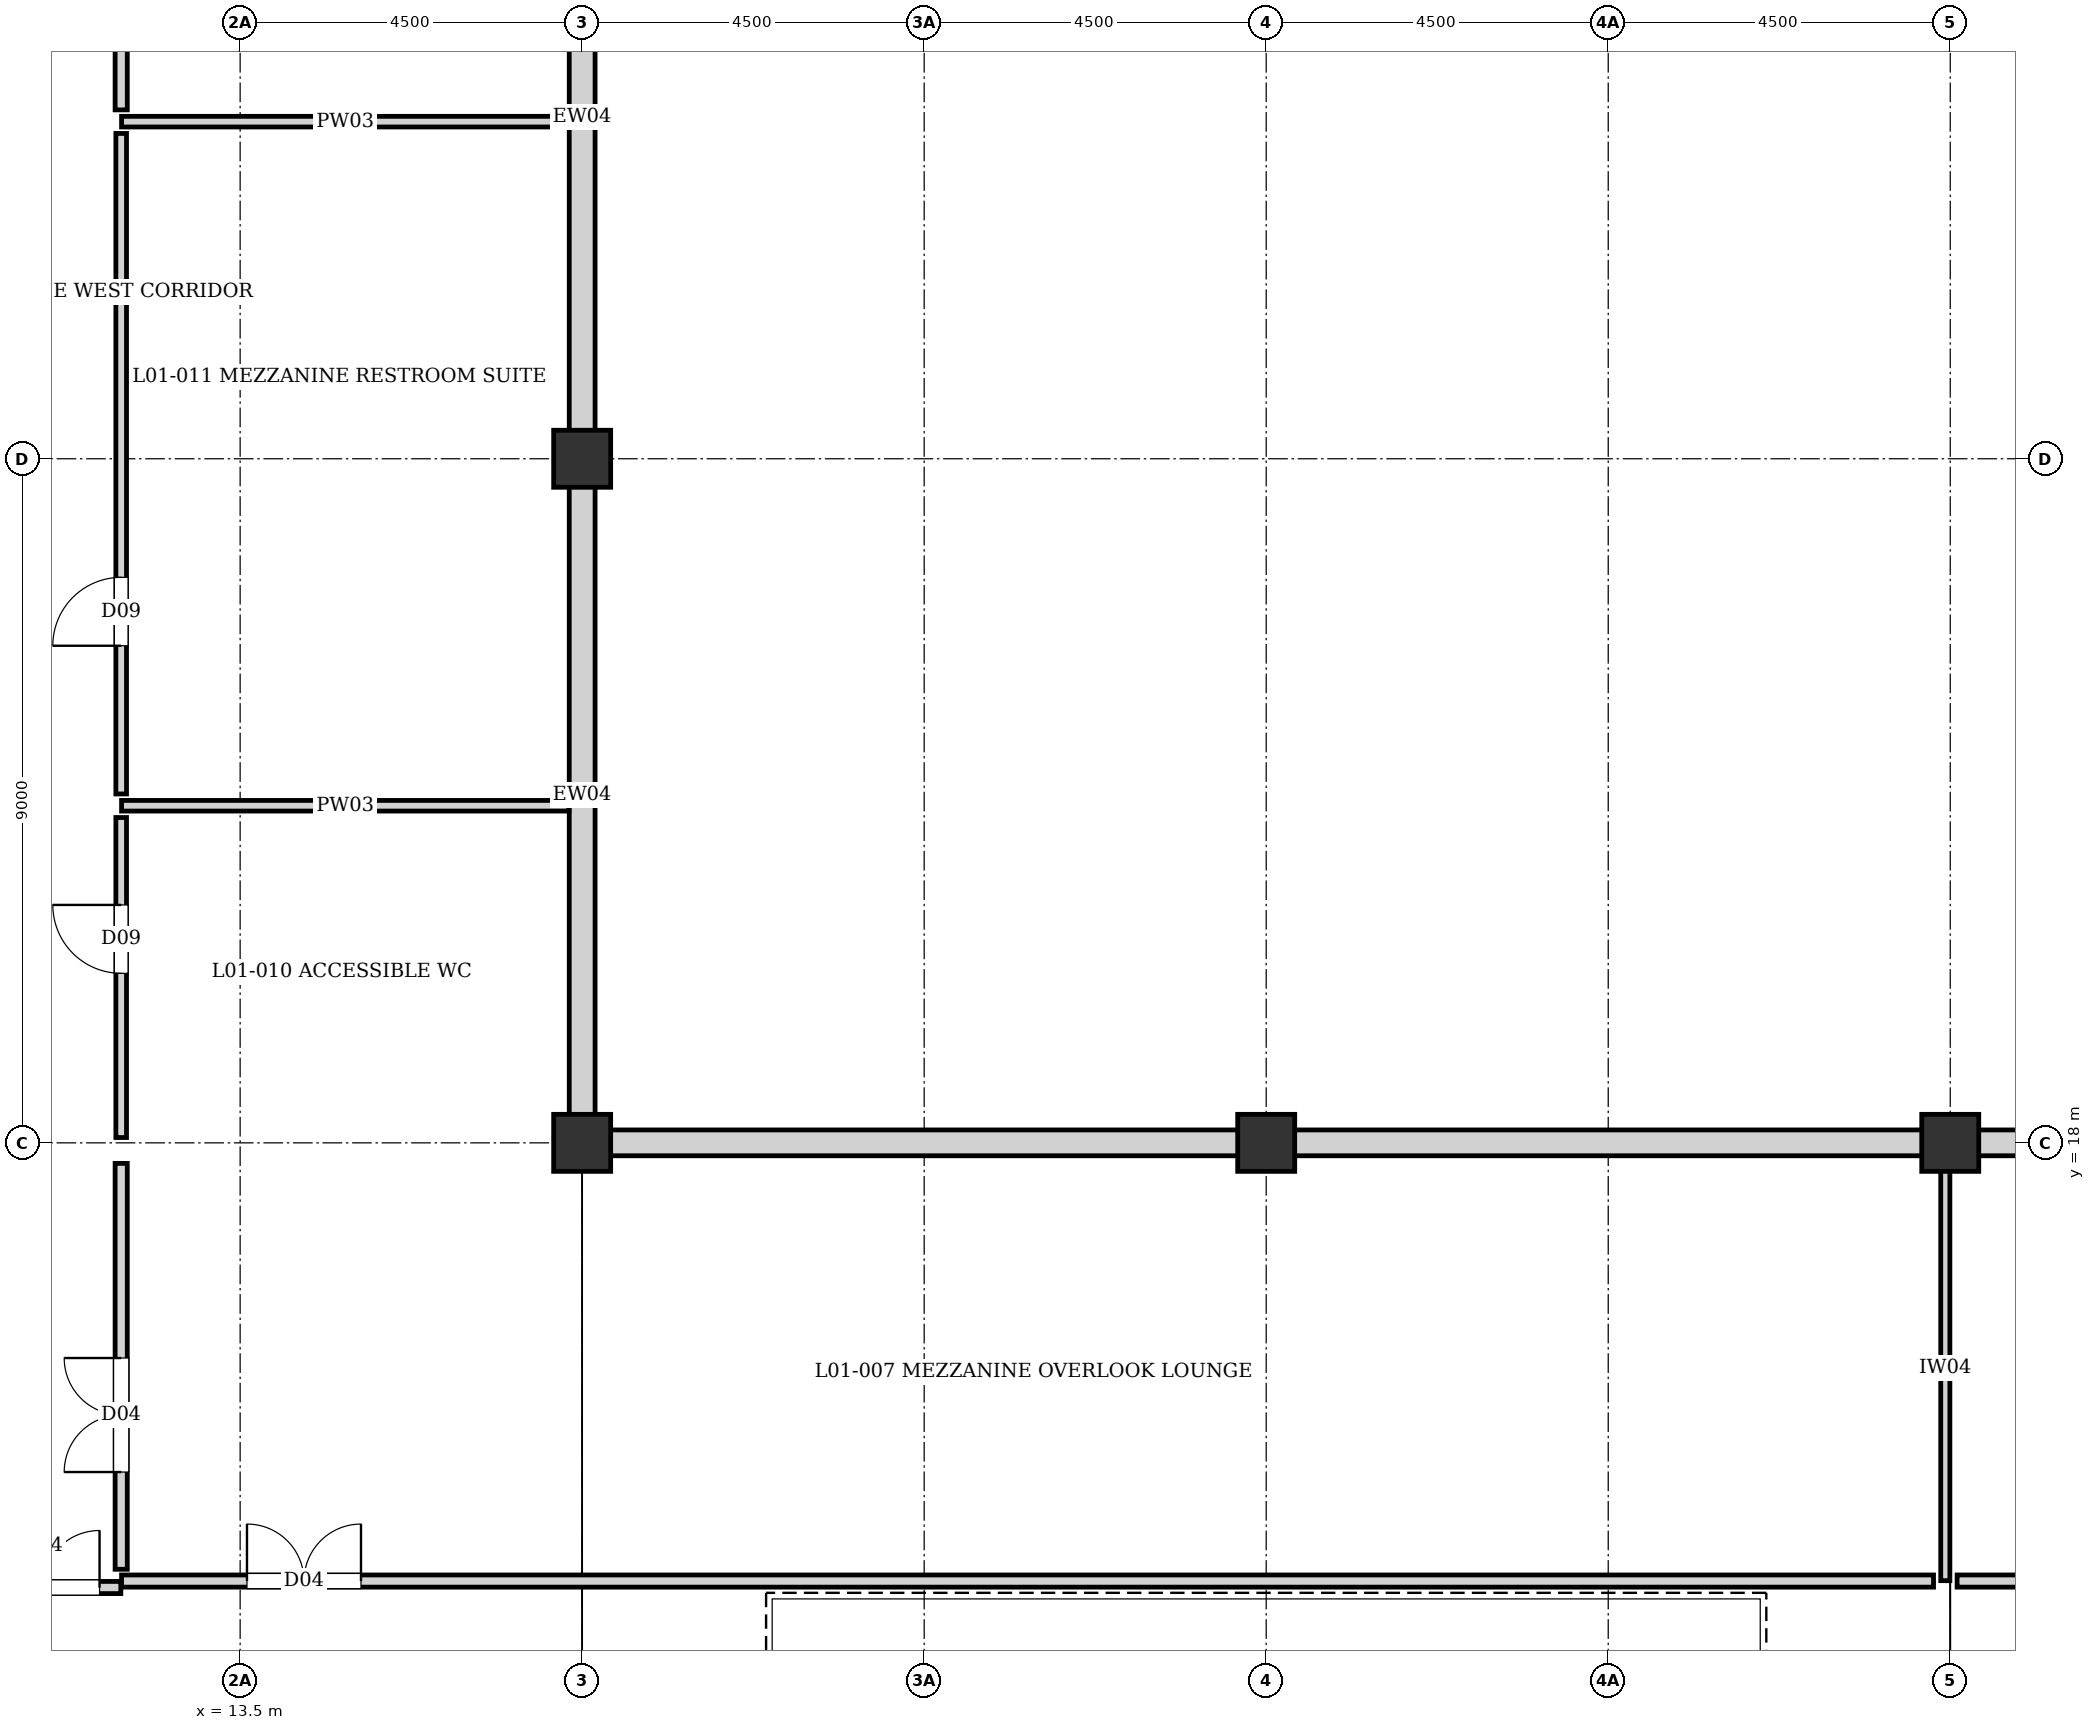
"""IFC4 building model, lengths in metres.
Left out: names, types, materials, properties, quantities, classifications, styles, units other than length and angle.
Written with IfcOpenShell. Run it as: python <this file> out.ifc"""

import sys

from ifc_helpers import new_model, si_unit, direction, frame, frame_2d, origin, origin_2d, place, context, subcontext, project, spatial, rectangle, extrude, element, fill, save


model = new_model("IFC4")
c1 = context("Model", 3, precision=1e-05, world=origin(), true_north=direction((0.0, 1.0)))
c2 = subcontext(c1, "Body", "Model", "MODEL_VIEW")
j1 = project(units=[si_unit("LENGTHUNIT", "METRE"), si_unit("PLANEANGLEUNIT", "RADIAN")], contexts=[c1])
p1 = place(None, origin())
s1 = spatial("IfcSite", under=j1, at=p1, CompositionType="ELEMENT")
p2 = place(p1, origin())
s2 = spatial("IfcBuilding", under=s1, at=p2, CompositionType="ELEMENT")
p3 = place(p2, frame((0.0, 0.0, 4.32)))
s3 = spatial("IfcBuildingStorey", under=s2, at=p3, CompositionType="ELEMENT", Elevation=4.32)
for number, where, z_axis, x_axis in (
    (1, (18.0, 18.0, 0.0), (0.0, 0.0, 1.0), (1.0, 0.0, 0.0)),
    (2, (18.0, 27.0, 0.0), (0.0, 0.0, 1.0), (1.0, 0.0, 0.0)),
    (3, (27.0, 18.0, 0.0), (0.0, 0.0, 1.0), (1.0, 0.0, 0.0)),
    (4, (36.0, 18.0, 0.0), (0.0, 0.0, 1.0), (1.0, 0.0, 0.0)),
):
    element("IfcColumn", number, at=place(p3, frame(where, z_axis=z_axis, x_axis=x_axis)), inside=s3, PredefinedType="COLUMN", context=c2, shape_type="SweptSolid", body=[
        extrude(rectangle(XDim=0.75, YDim=0.75, at=origin_2d()), origin(), (0.0, 0.0, 1.0), 3.84),
    ])
p4 = place(p3, frame((18.0, 36.0, 0.0), z_axis=(0.0, 0.0, 1.0), x_axis=(0.0, -1.0, 0.0)))
e5 = element("IfcWall", 5, at=p4, inside=s3, PredefinedType="SOLIDWALL", context=c2, shape_type="SweptSolid", body=[
    extrude(rectangle(XDim=9.0, YDim=0.34, at=frame_2d((4.5, 0.0))), origin(), (0.0, 0.0, 1.0), 2.48),
])
p5 = place(p3, frame((18.0, 27.0, 0.0), z_axis=(0.0, 0.0, 1.0), x_axis=(0.0, -1.0, 0.0)))
e6 = element("IfcWall", 6, at=p5, inside=s3, PredefinedType="SOLIDWALL", context=c2, shape_type="SweptSolid", body=[
    extrude(rectangle(XDim=8.845, YDim=0.34, at=frame_2d((4.422, 0.0))), origin(), (0.0, 0.0, 1.0), 2.48),
])
p6 = place(p3, frame((18.0, 18.0, 0.0), z_axis=(0.0, 0.0, 1.0), x_axis=(1.0, 0.0, 0.0)))
e7 = element("IfcWall", 7, at=p6, inside=s3, PredefinedType="SOLIDWALL", context=c2, shape_type="SweptSolid", body=[
    extrude(rectangle(XDim=9.0, YDim=0.34, at=frame_2d((4.5, 0.0))), origin(), (0.0, 0.0, 1.0), 2.38),
])
p7 = place(p3, frame((27.0, 18.0, 0.0), z_axis=(0.0, 0.0, 1.0), x_axis=(1.0, 0.0, 0.0)))
e8 = element("IfcWall", 8, at=p7, inside=s3, PredefinedType="SOLIDWALL", context=c2, shape_type="SweptSolid", body=[
    extrude(rectangle(XDim=9.0, YDim=0.34, at=frame_2d((4.5, 0.0))), origin(), (0.0, 0.0, 1.0), 2.18),
])
p8 = place(p3, frame((36.0, 18.0, 0.0), z_axis=(0.0, 0.0, 1.0), x_axis=(1.0, 0.0, 0.0)))
e9 = element("IfcWall", 9, at=p8, inside=s3, PredefinedType="SOLIDWALL", context=c2, shape_type="SweptSolid", body=[
    extrude(rectangle(XDim=9.0, YDim=0.34, at=frame_2d((4.5, 0.0))), origin(), (0.0, 0.0, 1.0), 3.18),
])
p9 = place(p8, frame((3.9, 0.0, 0.4)))
e10 = element("IfcOpeningElement", 10, at=p9, cuts=e9, PredefinedType="OPENING", context=c2, shape_type="SweptSolid", body=[
    extrude(rectangle(XDim=1.2, YDim=2.1, at=frame_2d((0.6, 1.05))), frame((0.0, 0.18, 0.0), z_axis=(0.0, -1.0, 0.0), x_axis=(1.0, 0.0, 0.0)), (0.0, 0.0, 1.0), 0.36),
])
p10 = place(p3, frame((35.935, 12.24, 0.0), z_axis=(0.0, 0.0, 1.0), x_axis=(0.0, 1.0, 0.0)))
e11 = element("IfcWall", 11, at=p10, inside=s3, PredefinedType="PARTITIONING", context=c2, shape_type="SweptSolid", body=[
    extrude(rectangle(XDim=5.585, YDim=0.12, at=frame_2d((2.792, 0.0))), origin(), (0.0, 0.0, 1.0), 3.25),
])
for number, where, z_axis, x_axis in (
    (12, (11.94, 22.435, 0.0), (0.0, 0.0, 1.0), (1.0, 0.0, 0.0)),
    (13, (11.94, 31.435, 0.0), (0.0, 0.0, 1.0), (1.0, 0.0, 0.0)),
):
    element("IfcWall", number, at=place(p3, frame(where, z_axis=z_axis, x_axis=x_axis)), inside=s3, PredefinedType="PLUMBINGWALL", context=c2, shape_type="SweptSolid", body=[
        extrude(rectangle(XDim=5.885, YDim=0.14, at=frame_2d((2.942, 0.0))), origin(), (0.0, 0.0, 1.0), 3.6),
    ])
p11 = place(p3, frame((9.22, 12.15, 0.0), z_axis=(0.0, 0.0, 1.0), x_axis=(1.0, 0.0, 0.0)))
e14 = element("IfcWall", 14, at=p11, inside=s3, PredefinedType="PARTITIONING", context=c2, shape_type="SweptSolid", body=[
    extrude(rectangle(XDim=2.71, YDim=0.16, at=frame_2d((1.355, 0.0))), origin(), (0.0, 0.0, 1.0), 3.6),
])
p12 = place(p11, frame((0.93, 0.0, 0.0)))
e15 = element("IfcOpeningElement", 15, at=p12, cuts=e14, PredefinedType="OPENING", context=c2, shape_type="SweptSolid", body=[
    extrude(rectangle(XDim=1.5, YDim=2.1, at=frame_2d((0.75, 1.05))), frame((0.0, 0.09, 0.0), z_axis=(0.0, -1.0, 0.0), x_axis=(1.0, 0.0, 0.0)), (0.0, 0.0, 1.0), 0.18),
])
p13 = place(p3, frame((36.09, 12.235, 0.0), z_axis=(0.0, 0.0, 1.0), x_axis=(1.0, 0.0, 0.0)))
e16 = element("IfcWall", 16, at=p13, inside=s3, PredefinedType="PARTITIONING", context=c2, shape_type="SweptSolid", body=[
    extrude(rectangle(XDim=35.58, YDim=0.16, at=frame_2d((17.79, 0.0))), origin(), (0.0, 0.0, 1.0), 3.6),
])
p14 = place(p13, frame((12.72, 0.0, 0.0)))
e17 = element("IfcOpeningElement", 17, at=p14, cuts=e16, PredefinedType="OPENING", context=c2, shape_type="SweptSolid", body=[
    extrude(rectangle(XDim=1.6, YDim=2.3, at=frame_2d((0.8, 1.15))), frame((0.0, 0.09, 0.0), z_axis=(0.0, -1.0, 0.0), x_axis=(1.0, 0.0, 0.0)), (0.0, 0.0, 1.0), 0.18),
])
p15 = place(p3, frame((11.94, 12.235, 0.0), z_axis=(0.0, 0.0, 1.0), x_axis=(1.0, 0.0, 0.0)))
e18 = element("IfcWall", 18, at=p15, inside=s3, PredefinedType="PARTITIONING", context=c2, shape_type="SweptSolid", body=[
    extrude(rectangle(XDim=23.84, YDim=0.16, at=frame_2d((11.92, 0.0))), origin(), (0.0, 0.0, 1.0), 3.6),
])
p16 = place(p15, frame((1.65, 0.0, 0.0)))
e19 = element("IfcOpeningElement", 19, at=p16, cuts=e18, PredefinedType="OPENING", context=c2, shape_type="SweptSolid", body=[
    extrude(rectangle(XDim=1.5, YDim=2.1, at=frame_2d((0.75, 1.05))), frame((0.0, 0.09, 0.0), z_axis=(0.0, -1.0, 0.0), x_axis=(1.0, 0.0, 0.0)), (0.0, 0.0, 1.0), 0.18),
])
p17 = place(p3, frame((11.935, 12.39, 0.0), z_axis=(0.0, 0.0, 1.0), x_axis=(0.0, 1.0, 0.0)))
e20 = element("IfcWall", 20, at=p17, inside=s3, PredefinedType="PARTITIONING", context=c2, shape_type="SweptSolid", body=[
    extrude(rectangle(XDim=5.34, YDim=0.16, at=frame_2d((2.67, 0.0))), origin(), (0.0, 0.0, 1.0), 3.6),
])
p18 = place(p17, frame((1.279, 0.0, 0.0)))
e21 = element("IfcOpeningElement", 21, at=p18, cuts=e20, PredefinedType="OPENING", context=c2, shape_type="SweptSolid", body=[
    extrude(rectangle(XDim=1.5, YDim=2.1, at=frame_2d((0.75, 1.05))), frame((0.0, 0.09, 0.0), z_axis=(0.0, -1.0, 0.0), x_axis=(1.0, 0.0, 0.0)), (0.0, 0.0, 1.0), 0.18),
])
p19 = place(p3, frame((11.935, 18.07, 0.0), z_axis=(0.0, 0.0, 1.0), x_axis=(0.0, 1.0, 0.0)))
e22 = element("IfcWall", 22, at=p19, inside=s3, PredefinedType="PLUMBINGWALL", context=c2, shape_type="SweptSolid", body=[
    extrude(rectangle(XDim=4.21, YDim=0.14, at=frame_2d((2.105, 0.0))), origin(), (0.0, 0.0, 1.0), 3.6),
])
p20 = place(p19, frame((2.16, 0.0, 0.0)))
e23 = element("IfcOpeningElement", 23, at=p20, cuts=e22, PredefinedType="OPENING", context=c2, shape_type="SweptSolid", body=[
    extrude(rectangle(XDim=0.9, YDim=2.1, at=frame_2d((0.45, 1.05))), frame((0.0, 0.08, 0.0), z_axis=(0.0, -1.0, 0.0), x_axis=(1.0, 0.0, 0.0)), (0.0, 0.0, 1.0), 0.16),
])
p21 = place(p3, frame((11.935, 22.59, 0.0), z_axis=(0.0, 0.0, 1.0), x_axis=(0.0, 1.0, 0.0)))
e24 = element("IfcWall", 24, at=p21, inside=s3, PredefinedType="PLUMBINGWALL", context=c2, shape_type="SweptSolid", body=[
    extrude(rectangle(XDim=8.69, YDim=0.14, at=frame_2d((4.345, 0.0))), origin(), (0.0, 0.0, 1.0), 3.6),
])
p22 = place(p21, frame((1.95, 0.0, 0.0)))
e25 = element("IfcOpeningElement", 25, at=p22, cuts=e24, PredefinedType="OPENING", context=c2, shape_type="SweptSolid", body=[
    extrude(rectangle(XDim=0.9, YDim=2.1, at=frame_2d((0.45, 1.05))), frame((0.0, 0.08, 0.0), z_axis=(0.0, -1.0, 0.0), x_axis=(1.0, 0.0, 0.0)), (0.0, 0.0, 1.0), 0.16),
])
p23 = place(p3, frame((11.935, 31.59, 0.0), z_axis=(0.0, 0.0, 1.0), x_axis=(0.0, 1.0, 0.0)))
e26 = element("IfcWall", 26, at=p23, inside=s3, PredefinedType="PARTITIONING", context=c2, shape_type="SweptSolid", body=[
    extrude(rectangle(XDim=40.08, YDim=0.16, at=frame_2d((20.04, 0.0))), origin(), (0.0, 0.0, 1.0), 3.6),
])
p24 = place(p23, frame((36.88, 0.0, 0.0)))
e27 = element("IfcOpeningElement", 27, at=p24, cuts=e26, PredefinedType="OPENING", context=c2, shape_type="SweptSolid", body=[
    extrude(rectangle(XDim=1.6, YDim=2.3, at=frame_2d((0.8, 1.15))), frame((0.0, 0.09, 0.0), z_axis=(0.0, -1.0, 0.0), x_axis=(1.0, 0.0, 0.0)), (0.0, 0.0, 1.0), 0.18),
])
p25 = place(p12, origin())
e28 = element("IfcDoor", 28, at=p25, inside=s3, OperationType="DOUBLE_DOOR_SINGLE_SWING", PredefinedType="DOOR", context=c2, shape_type="SweptSolid", body=[
    extrude(rectangle(XDim=1.5, YDim=2.1, at=frame_2d((0.75, 1.05))), frame((0.0, 0.025, 0.0), z_axis=(0.0, -1.0, 0.0), x_axis=(1.0, 0.0, 0.0)), (0.0, 0.0, 1.0), 0.05),
])
fill(e15, e28)
p26 = place(p16, origin())
e29 = element("IfcDoor", 29, at=p26, inside=s3, OperationType="DOUBLE_DOOR_SINGLE_SWING", PredefinedType="DOOR", context=c2, shape_type="SweptSolid", body=[
    extrude(rectangle(XDim=1.5, YDim=2.1, at=frame_2d((0.75, 1.05))), frame((0.0, 0.025, 0.0), z_axis=(0.0, -1.0, 0.0), x_axis=(1.0, 0.0, 0.0)), (0.0, 0.0, 1.0), 0.05),
])
fill(e19, e29)
p27 = place(p18, origin())
e30 = element("IfcDoor", 30, at=p27, inside=s3, OperationType="DOUBLE_DOOR_SINGLE_SWING", PredefinedType="DOOR", context=c2, shape_type="SweptSolid", body=[
    extrude(rectangle(XDim=1.5, YDim=2.1, at=frame_2d((0.75, 1.05))), frame((0.0, 0.025, 0.0), z_axis=(0.0, -1.0, 0.0), x_axis=(1.0, 0.0, 0.0)), (0.0, 0.0, 1.0), 0.05),
])
fill(e21, e30)
p28 = place(p20, origin())
e31 = element("IfcDoor", 31, at=p28, inside=s3, OperationType="SINGLE_SWING_RIGHT", PredefinedType="DOOR", context=c2, shape_type="SweptSolid", body=[
    extrude(rectangle(XDim=0.9, YDim=2.1, at=frame_2d((0.45, 1.05))), frame((0.0, 0.025, 0.0), z_axis=(0.0, -1.0, 0.0), x_axis=(1.0, 0.0, 0.0)), (0.0, 0.0, 1.0), 0.05),
])
fill(e23, e31)
p29 = place(p22, origin())
e32 = element("IfcDoor", 32, at=p29, inside=s3, OperationType="SINGLE_SWING_LEFT", PredefinedType="DOOR", context=c2, shape_type="SweptSolid", body=[
    extrude(rectangle(XDim=0.9, YDim=2.1, at=frame_2d((0.45, 1.05))), frame((0.0, 0.025, 0.0), z_axis=(0.0, -1.0, 0.0), x_axis=(1.0, 0.0, 0.0)), (0.0, 0.0, 1.0), 0.05),
])
fill(e25, e32)
save(model, sys.argv[1])
